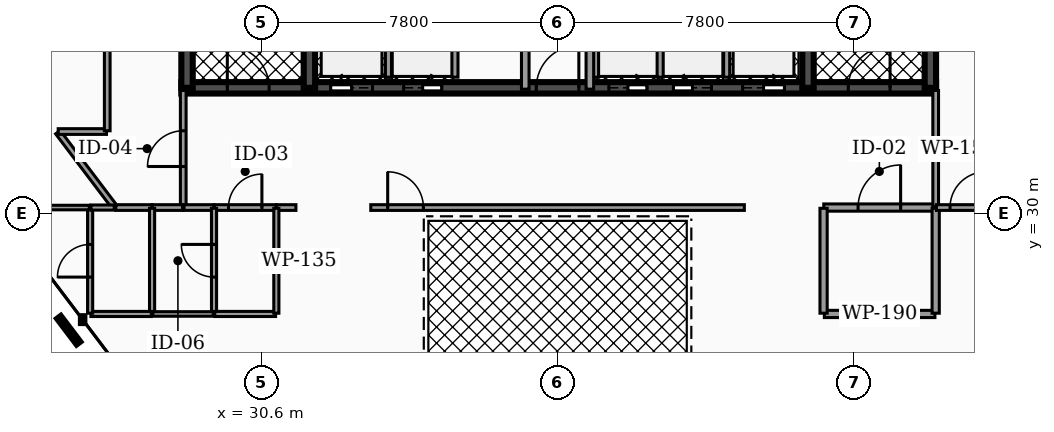
"""IFC4 building model, lengths in metres.
Left out: names, types, materials, properties, quantities, classifications, styles, units other than length and angle.
Written with IfcOpenShell. Run it as: python <this file> out.ifc"""

import sys

from ifc_helpers import new_model, si_unit, direction, frame, frame_2d, origin, place, context, subcontext, project, spatial, rectangle, extrude, element, fill, save


model = new_model("IFC4")
c1 = context("Model", 3, precision=1e-05, world=origin(), true_north=direction((0.0, 1.0)))
c2 = subcontext(c1, "Body", "Model", "MODEL_VIEW")
j1 = project(units=[si_unit("LENGTHUNIT", "METRE"), si_unit("PLANEANGLEUNIT", "RADIAN")], contexts=[c1])
p1 = place(None, origin())
s1 = spatial("IfcSite", under=j1, at=p1, CompositionType="ELEMENT")
p2 = place(p1, origin())
s2 = spatial("IfcBuilding", under=s1, at=p2, CompositionType="ELEMENT")
p3 = place(p2, frame((0.0, 0.0, 232.56)))
s3 = spatial("IfcBuildingStorey", under=s2, at=p3, CompositionType="ELEMENT", Elevation=232.56)
p4 = place(p3, frame((28.5, 33.3, 0.0), z_axis=(0.0, 0.0, 1.0), x_axis=(1.0, 0.0, 0.0)))
e1 = element("IfcWall", 1, at=p4, inside=s3, PredefinedType="SHEAR", context=c2, shape_type="SweptSolid", body=[
    extrude(rectangle(XDim=19.86, YDim=0.3, at=frame_2d((9.93, 0.0))), origin(), (0.0, 0.0, 1.0), 3.18),
])
p5 = place(p4, frame((3.93, 0.0, 0.0)))
e2 = element("IfcOpeningElement", 2, at=p5, cuts=e1, PredefinedType="OPENING", context=c2, shape_type="SweptSolid", body=[
    extrude(rectangle(XDim=1.1, YDim=2.15, at=frame_2d((0.55, 1.075))), frame((0.0, 0.16, 0.0), z_axis=(0.0, -1.0, 0.0), x_axis=(1.0, 0.0, 0.0)), (0.0, 0.0, 1.0), 0.32),
])
p6 = place(p4, frame((14.77, 0.0, 0.0)))
e3 = element("IfcOpeningElement", 3, at=p6, cuts=e1, PredefinedType="OPENING", context=c2, shape_type="SweptSolid", body=[
    extrude(rectangle(XDim=1.1, YDim=2.15, at=frame_2d((0.55, 1.075))), frame((0.0, 0.16, 0.0), z_axis=(0.0, -1.0, 0.0), x_axis=(1.0, 0.0, 0.0)), (0.0, 0.0, 1.0), 0.32),
])
p7 = place(p4, frame((11.25, 0.0, 0.0)))
e4 = element("IfcOpeningElement", 4, at=p7, cuts=e1, PredefinedType="OPENING", context=c2, shape_type="SweptSolid", body=[
    extrude(rectangle(XDim=1.0, YDim=2.1, at=frame_2d((0.5, 1.05))), frame((0.0, 0.16, 0.0), z_axis=(0.0, -1.0, 0.0), x_axis=(1.0, 0.0, 0.0)), (0.0, 0.0, 1.0), 0.32),
])
p8 = place(p4, frame((12.95, 0.0, 0.0)))
e5 = element("IfcOpeningElement", 5, at=p8, cuts=e1, PredefinedType="OPENING", context=c2, shape_type="SweptSolid", body=[
    extrude(rectangle(XDim=1.0, YDim=2.1, at=frame_2d((0.5, 1.05))), frame((0.0, 0.16, 0.0), z_axis=(0.0, -1.0, 0.0), x_axis=(1.0, 0.0, 0.0)), (0.0, 0.0, 1.0), 0.32),
])
p9 = place(p4, frame((5.85, 0.0, 0.0)))
e6 = element("IfcOpeningElement", 6, at=p9, cuts=e1, PredefinedType="OPENING", context=c2, shape_type="SweptSolid", body=[
    extrude(rectangle(XDim=1.0, YDim=2.1, at=frame_2d((0.5, 1.05))), frame((0.0, 0.16, 0.0), z_axis=(0.0, -1.0, 0.0), x_axis=(1.0, 0.0, 0.0)), (0.0, 0.0, 1.0), 0.32),
])
p10 = place(p4, frame((1.21, 0.0, 0.0)))
e7 = element("IfcOpeningElement", 7, at=p10, cuts=e1, PredefinedType="OPENING", context=c2, shape_type="SweptSolid", body=[
    extrude(rectangle(XDim=1.1, YDim=2.2, at=frame_2d((0.55, 1.1))), frame((0.0, 0.16, 0.0), z_axis=(0.0, -1.0, 0.0), x_axis=(1.0, 0.0, 0.0)), (0.0, 0.0, 1.0), 0.32),
])
p11 = place(p4, frame((9.34, 0.0, 0.0)))
e8 = element("IfcOpeningElement", 8, at=p11, cuts=e1, PredefinedType="OPENING", context=c2, shape_type="SweptSolid", body=[
    extrude(rectangle(XDim=1.12, YDim=2.05, at=frame_2d((0.56, 1.025))), frame((0.0, 0.16, 0.0), z_axis=(0.0, -1.0, 0.0), x_axis=(1.0, 0.0, 0.0)), (0.0, 0.0, 1.0), 0.32),
])
p12 = place(p4, frame((17.55, 0.0, 0.0)))
e9 = element("IfcOpeningElement", 9, at=p12, cuts=e1, PredefinedType="OPENING", context=c2, shape_type="SweptSolid", body=[
    extrude(rectangle(XDim=1.1, YDim=2.2, at=frame_2d((0.55, 1.1))), frame((0.0, 0.16, 0.0), z_axis=(0.0, -1.0, 0.0), x_axis=(1.0, 0.0, 0.0)), (0.0, 0.0, 1.0), 0.32),
])
for number, where, z_axis, x_axis in (
    (10, (28.65, 33.3, 0.0), (0.0, 0.0, 1.0), (0.0, 1.0, 0.0)),
    (11, (31.87, 33.3, 0.0), (0.0, 0.0, 1.0), (0.0, 1.0, 0.0)),
    (12, (44.99, 33.3, 0.0), (0.0, 0.0, 1.0), (0.0, 1.0, 0.0)),
    (13, (48.21, 33.3, 0.0), (0.0, 0.0, 1.0), (0.0, 1.0, 0.0)),
):
    element("IfcWall", number, at=place(p3, frame(where, z_axis=z_axis, x_axis=x_axis)), inside=s3, PredefinedType="SHEAR", context=c2, shape_type="SweptSolid", body=[
        extrude(rectangle(XDim=10.1, YDim=0.3, at=frame_2d((5.05, 0.0))), origin(), (0.0, 0.0, 1.0), 3.18),
    ])
for number, where, z_axis, x_axis in (
    (14, (33.95, 33.58, 0.0), (0.0, 0.0, 1.0), (0.0, 1.0, 0.0)),
    (15, (42.85, 33.58, 0.0), (0.0, 0.0, 1.0), (0.0, 1.0, 0.0)),
):
    element("IfcWall", number, at=place(p3, frame(where, z_axis=z_axis, x_axis=x_axis)), inside=s3, PredefinedType="SOLIDWALL", context=c2, shape_type="SweptSolid", body=[
        extrude(rectangle(XDim=2.45, YDim=0.16, at=frame_2d((1.225, 0.0))), origin(), (0.0, 0.0, 1.0), 3.18),
    ])
for number, where, z_axis, x_axis in (
    (16, (39.4, 33.58, 0.0), (0.0, 0.0, 1.0), (0.0, 1.0, 0.0)),
    (17, (41.1, 33.58, 0.0), (0.0, 0.0, 1.0), (0.0, 1.0, 0.0)),
    (18, (35.7, 33.58, 0.0), (0.0, 0.0, 1.0), (0.0, 1.0, 0.0)),
):
    element("IfcWall", number, at=place(p3, frame(where, z_axis=z_axis, x_axis=x_axis)), inside=s3, PredefinedType="SOLIDWALL", context=c2, shape_type="SweptSolid", body=[
        extrude(rectangle(XDim=2.25, YDim=0.16, at=frame_2d((1.125, 0.0))), origin(), (0.0, 0.0, 1.0), 3.18),
    ])
p13 = place(p3, frame((37.55, 33.265, 0.0), z_axis=(0.0, 0.0, 1.0), x_axis=(0.0, 1.0, 0.0)))
e19 = element("IfcWall", 19, at=p13, inside=s3, PredefinedType="PARTITIONING", context=c2, shape_type="SweptSolid", body=[
    extrude(rectangle(XDim=4.595, YDim=0.2, at=frame_2d((2.298, 0.0))), origin(), (0.0, 0.0, 1.0), 2.235),
])
p14 = place(p13, frame((1.857, 0.0, 0.0)))
e20 = element("IfcOpeningElement", 20, at=p14, cuts=e19, PredefinedType="OPENING", context=c2, shape_type="SweptSolid", body=[
    extrude(rectangle(XDim=0.88, YDim=2.05, at=frame_2d((0.44, 1.025))), frame((0.0, 0.11, 0.0), z_axis=(0.0, -1.0, 0.0), x_axis=(1.0, 0.0, 0.0)), (0.0, 0.0, 1.0), 0.22),
])
p15 = place(p3, frame((39.25, 33.265, 0.0), z_axis=(0.0, 0.0, 1.0), x_axis=(0.0, 1.0, 0.0)))
e21 = element("IfcWall", 21, at=p15, inside=s3, PredefinedType="PARTITIONING", context=c2, shape_type="SweptSolid", body=[
    extrude(rectangle(XDim=4.595, YDim=0.2, at=frame_2d((2.298, 0.0))), origin(), (0.0, 0.0, 1.0), 2.235),
])
p16 = place(p15, frame((3.058, 0.0, 0.0)))
e22 = element("IfcOpeningElement", 22, at=p16, cuts=e21, PredefinedType="OPENING", context=c2, shape_type="SweptSolid", body=[
    extrude(rectangle(XDim=0.88, YDim=2.05, at=frame_2d((0.44, 1.025))), frame((0.0, 0.11, 0.0), z_axis=(0.0, -1.0, 0.0), x_axis=(1.0, 0.0, 0.0)), (0.0, 0.0, 1.0), 0.22),
])
p17 = place(p3, frame((45.405, 30.15, 0.0), z_axis=(0.0, 0.0, 1.0), x_axis=(1.0, 0.0, 0.0)))
e23 = element("IfcWall", 23, at=p17, inside=s3, PredefinedType="PARTITIONING", context=c2, shape_type="SweptSolid", body=[
    extrude(rectangle(XDim=2.925, YDim=0.19, at=frame_2d((1.462, 0.0))), origin(), (0.0, 0.0, 1.0), 2.235),
])
p18 = place(p17, frame((0.903, 0.0, 0.0)))
e24 = element("IfcOpeningElement", 24, at=p18, cuts=e23, PredefinedType="OPENING", context=c2, shape_type="SweptSolid", body=[
    extrude(rectangle(XDim=1.12, YDim=2.05, at=frame_2d((0.56, 1.025))), frame((0.0, 0.105, 0.0), z_axis=(0.0, -1.0, 0.0), x_axis=(1.0, 0.0, 0.0)), (0.0, 0.0, 1.0), 0.21),
])
p19 = place(p3, frame((28.55, 30.17, 0.0), z_axis=(0.0, 0.0, 1.0), x_axis=(0.0, 1.0, 0.0)))
e25 = element("IfcWall", 25, at=p19, inside=s3, PredefinedType="PARTITIONING", context=c2, shape_type="SweptSolid", body=[
    extrude(rectangle(XDim=3.06, YDim=0.15, at=frame_2d((1.53, 0.0))), origin(), (0.0, 0.0, 1.0), 2.235),
])
p20 = place(p19, frame((1.06, 0.0, 0.0)))
e26 = element("IfcOpeningElement", 26, at=p20, cuts=e25, PredefinedType="OPENING", context=c2, shape_type="SweptSolid", body=[
    extrude(rectangle(XDim=0.94, YDim=2.05, at=frame_2d((0.47, 1.025))), frame((0.0, 0.085, 0.0), z_axis=(0.0, -1.0, 0.0), x_axis=(1.0, 0.0, 0.0)), (0.0, 0.0, 1.0), 0.17),
])
p21 = place(p3, frame((48.35, 30.17, 0.0), z_axis=(0.0, 0.0, 1.0), x_axis=(0.0, 1.0, 0.0)))
e27 = element("IfcWall", 27, at=p21, inside=s3, PredefinedType="PARTITIONING", context=c2, shape_type="SweptSolid", body=[
    extrude(rectangle(XDim=3.06, YDim=0.15, at=frame_2d((1.53, 0.0))), origin(), (0.0, 0.0, 1.0), 2.235),
])
p22 = place(p3, frame((29.365, 30.15, 0.0), z_axis=(0.0, 0.0, 1.0), x_axis=(1.0, 0.0, 0.0)))
e28 = element("IfcWall", 28, at=p22, inside=s3, PredefinedType="PARTITIONING", context=c2, shape_type="SweptSolid", body=[
    extrude(rectangle(XDim=1.63, YDim=0.15, at=frame_2d((0.815, 0.0))), origin(), (0.0, 0.0, 1.0), 2.235),
])
p23 = place(p22, frame((0.375, 0.0, 0.0)))
e29 = element("IfcOpeningElement", 29, at=p23, cuts=e28, PredefinedType="OPENING", context=c2, shape_type="SweptSolid", body=[
    extrude(rectangle(XDim=0.88, YDim=2.05, at=frame_2d((0.44, 1.025))), frame((0.0, 0.085, 0.0), z_axis=(0.0, -1.0, 0.0), x_axis=(1.0, 0.0, 0.0)), (0.0, 0.0, 1.0), 0.17),
])
p24 = place(p3, frame((28.57, 30.15, 0.0), z_axis=(0.0, 0.0, 1.0), x_axis=(1.0, 0.0, 0.0)))
e30 = element("IfcWall", 30, at=p24, inside=s3, PredefinedType="PARTITIONING", context=c2, shape_type="SweptSolid", body=[
    extrude(rectangle(XDim=0.785, YDim=0.15, at=frame_2d((0.393, 0.0))), origin(), (0.0, 0.0, 1.0), 2.235),
])
p25 = place(p3, frame((33.485, 30.15, 0.0), z_axis=(0.0, 0.0, 1.0), x_axis=(1.0, 0.0, 0.0)))
e31 = element("IfcWall", 31, at=p25, inside=s3, PredefinedType="PARTITIONING", context=c2, shape_type="SweptSolid", body=[
    extrude(rectangle(XDim=9.83, YDim=0.15, at=frame_2d((4.915, 0.0))), origin(), (0.0, 0.0, 1.0), 2.235),
])
p26 = place(p25, frame((0.445, 0.0, 0.0)))
e32 = element("IfcOpeningElement", 32, at=p26, cuts=e31, PredefinedType="OPENING", context=c2, shape_type="SweptSolid", body=[
    extrude(rectangle(XDim=0.94, YDim=2.05, at=frame_2d((0.47, 1.025))), frame((0.0, 0.085, 0.0), z_axis=(0.0, -1.0, 0.0), x_axis=(1.0, 0.0, 0.0)), (0.0, 0.0, 1.0), 0.17),
])
p27 = place(p3, frame((31.005, 30.15, 0.0), z_axis=(0.0, 0.0, 1.0), x_axis=(1.0, 0.0, 0.0)))
e33 = element("IfcWall", 33, at=p27, inside=s3, PredefinedType="PARTITIONING", context=c2, shape_type="SweptSolid", body=[
    extrude(rectangle(XDim=0.51, YDim=0.15, at=frame_2d((0.255, 0.0))), origin(), (0.0, 0.0, 1.0), 2.235),
])
p28 = place(p3, frame((45.42, 27.35, 0.0), z_axis=(0.0, 0.0, 1.0), x_axis=(1.0, 0.0, 0.0)))
e34 = element("IfcWall", 34, at=p28, inside=s3, PredefinedType="PARTITIONING", context=c2, shape_type="SweptSolid", body=[
    extrude(rectangle(XDim=2.91, YDim=0.19, at=frame_2d((1.455, 0.0))), origin(), (0.0, 0.0, 1.0), 2.235),
])
for number, where, z_axis, x_axis in (
    (35, (45.4, 27.37, 0.0), (0.0, 0.0, 1.0), (0.0, 1.0, 0.0)),
    (36, (48.35, 27.37, 0.0), (0.0, 0.0, 1.0), (0.0, 1.0, 0.0)),
):
    element("IfcWall", number, at=place(p3, frame(where, z_axis=z_axis, x_axis=x_axis)), inside=s3, PredefinedType="PARTITIONING", context=c2, shape_type="SweptSolid", body=[
        extrude(rectangle(XDim=2.76, YDim=0.19, at=frame_2d((1.38, 0.0))), origin(), (0.0, 0.0, 1.0), 2.235),
    ])
p29 = place(p3, frame((26.775, 30.15, 0.0), z_axis=(0.0, 0.0, 1.0), x_axis=(1.0, 0.0, 0.0)))
e37 = element("IfcWall", 37, at=p29, inside=s3, PredefinedType="PARTITIONING", context=c2, shape_type="SweptSolid", body=[
    extrude(rectangle(XDim=0.95, YDim=0.15, at=frame_2d((0.475, 0.0))), origin(), (0.0, 0.0, 1.0), 2.235),
])
p30 = place(p3, frame((27.735, 30.15, 0.0), z_axis=(0.0, 0.0, 1.0), x_axis=(1.0, 0.0, 0.0)))
e38 = element("IfcWall", 38, at=p30, inside=s3, PredefinedType="PARTITIONING", context=c2, shape_type="SweptSolid", body=[
    extrude(rectangle(XDim=0.795, YDim=0.15, at=frame_2d((0.397, 0.0))), origin(), (0.0, 0.0, 1.0), 2.235),
])
p31 = place(p3, frame((48.37, 30.15, 0.0), z_axis=(0.0, 0.0, 1.0), x_axis=(1.0, 0.0, 0.0)))
e39 = element("IfcWall", 39, at=p31, inside=s3, PredefinedType="PARTITIONING", context=c2, shape_type="SweptSolid", body=[
    extrude(rectangle(XDim=1.655, YDim=0.15, at=frame_2d((0.828, 0.0))), origin(), (0.0, 0.0, 1.0), 2.235),
])
p32 = place(p31, frame((0.358, 0.0, 0.0)))
e40 = element("IfcOpeningElement", 40, at=p32, cuts=e39, PredefinedType="OPENING", context=c2, shape_type="SweptSolid", body=[
    extrude(rectangle(XDim=0.94, YDim=2.05, at=frame_2d((0.47, 1.025))), frame((0.0, 0.085, 0.0), z_axis=(0.0, -1.0, 0.0), x_axis=(1.0, 0.0, 0.0)), (0.0, 0.0, 1.0), 0.17),
])
p33 = place(p3, frame((25.252, 32.134, 0.0), z_axis=(0.0, 0.0, 1.0), x_axis=(0.603869110647, -0.797083494502, 0.0)))
e41 = element("IfcWall", 41, at=p33, inside=s3, PredefinedType="PARTITIONING", context=c2, shape_type="SweptSolid", body=[
    extrude(rectangle(XDim=2.469, YDim=0.15, at=frame_2d((1.234, 0.0))), origin(), (0.0, 0.0, 1.0), 2.235),
])
p34 = place(p3, frame((25.26, 32.15, 0.0), z_axis=(0.0, 0.0, 1.0), x_axis=(1.0, 0.0, 0.0)))
e42 = element("IfcWall", 42, at=p34, inside=s3, PredefinedType="PARTITIONING", context=c2, shape_type="SweptSolid", body=[
    extrude(rectangle(XDim=1.271, YDim=0.15, at=frame_2d((0.635, 0.0))), origin(), (0.0, 0.0, 1.0), 2.235),
])
p35 = place(p3, frame((26.55, 32.17, 0.0), z_axis=(0.0, 0.0, 1.0), x_axis=(0.0, 1.0, 0.0)))
e43 = element("IfcWall", 43, at=p35, inside=s3, PredefinedType="PARTITIONING", context=c2, shape_type="SweptSolid", body=[
    extrude(rectangle(XDim=11.38, YDim=0.15, at=frame_2d((5.69, 0.0))), origin(), (0.0, 0.0, 1.0), 2.235),
])
p36 = place(p35, frame((5.22, 0.0, 0.0)))
e44 = element("IfcOpeningElement", 44, at=p36, cuts=e43, PredefinedType="OPENING", context=c2, shape_type="SweptSolid", body=[
    extrude(rectangle(XDim=0.94, YDim=2.05, at=frame_2d((0.47, 1.025))), frame((0.0, 0.085, 0.0), z_axis=(0.0, -1.0, 0.0), x_axis=(1.0, 0.0, 0.0)), (0.0, 0.0, 1.0), 0.17),
])
p37 = place(p3, frame((29.36, 27.37, 0.0), z_axis=(0.0, 0.0, 1.0), x_axis=(0.0, 1.0, 0.0)))
e45 = element("IfcWall", 45, at=p37, inside=s3, PredefinedType="PARTITIONING", context=c2, shape_type="SweptSolid", body=[
    extrude(rectangle(XDim=2.76, YDim=0.135, at=frame_2d((1.38, 0.0))), origin(), (0.0, 0.0, 1.0), 2.235),
])
p38 = place(p37, frame((0.95, 0.0, 0.0)))
e46 = element("IfcOpeningElement", 46, at=p38, cuts=e45, PredefinedType="OPENING", context=c2, shape_type="SweptSolid", body=[
    extrude(rectangle(XDim=0.86, YDim=2.05, at=frame_2d((0.43, 1.025))), frame((0.0, 0.077, 0.0), z_axis=(0.0, -1.0, 0.0), x_axis=(1.0, 0.0, 0.0)), (0.0, 0.0, 1.0), 0.155),
])
p39 = place(p3, frame((29.38, 27.35, 0.0), z_axis=(0.0, 0.0, 1.0), x_axis=(1.0, 0.0, 0.0)))
e47 = element("IfcWall", 47, at=p39, inside=s3, PredefinedType="PARTITIONING", context=c2, shape_type="SweptSolid", body=[
    extrude(rectangle(XDim=1.6, YDim=0.135, at=frame_2d((0.8, 0.0))), origin(), (0.0, 0.0, 1.0), 2.235),
])
for number, where, z_axis, x_axis in (
    (48, (31.0, 27.37, 0.0), (0.0, 0.0, 1.0), (0.0, 1.0, 0.0)),
    (49, (27.73, 27.37, 0.0), (0.0, 0.0, 1.0), (0.0, 1.0, 0.0)),
):
    element("IfcWall", number, at=place(p3, frame(where, z_axis=z_axis, x_axis=x_axis)), inside=s3, PredefinedType="PARTITIONING", context=c2, shape_type="SweptSolid", body=[
        extrude(rectangle(XDim=2.76, YDim=0.135, at=frame_2d((1.38, 0.0))), origin(), (0.0, 0.0, 1.0), 2.235),
    ])
p40 = place(p3, frame((26.12, 27.35, 0.0), z_axis=(0.0, 0.0, 1.0), x_axis=(1.0, 0.0, 0.0)))
e50 = element("IfcWall", 50, at=p40, inside=s3, PredefinedType="PARTITIONING", context=c2, shape_type="SweptSolid", body=[
    extrude(rectangle(XDim=1.59, YDim=0.135, at=frame_2d((0.795, 0.0))), origin(), (0.0, 0.0, 1.0), 2.235),
])
p41 = place(p3, frame((26.1, 27.37, 0.0), z_axis=(0.0, 0.0, 1.0), x_axis=(0.0, 1.0, 0.0)))
e51 = element("IfcWall", 51, at=p41, inside=s3, PredefinedType="PARTITIONING", context=c2, shape_type="SweptSolid", body=[
    extrude(rectangle(XDim=2.76, YDim=0.135, at=frame_2d((1.38, 0.0))), origin(), (0.0, 0.0, 1.0), 2.235),
])
p42 = place(p41, frame((0.95, 0.0, 0.0)))
e52 = element("IfcOpeningElement", 52, at=p42, cuts=e51, PredefinedType="OPENING", context=c2, shape_type="SweptSolid", body=[
    extrude(rectangle(XDim=0.86, YDim=2.05, at=frame_2d((0.43, 1.025))), frame((0.0, 0.077, 0.0), z_axis=(0.0, -1.0, 0.0), x_axis=(1.0, 0.0, 0.0)), (0.0, 0.0, 1.0), 0.155),
])
p43 = place(p3, frame((26.12, 30.15, 0.0), z_axis=(0.0, 0.0, 1.0), x_axis=(1.0, 0.0, 0.0)))
e53 = element("IfcWall", 53, at=p43, inside=s3, PredefinedType="PARTITIONING", context=c2, shape_type="SweptSolid", body=[
    extrude(rectangle(XDim=0.615, YDim=0.135, at=frame_2d((0.307, 0.0))), origin(), (0.0, 0.0, 1.0), 2.235),
])
p44 = place(p3, frame((27.75, 27.35, 0.0), z_axis=(0.0, 0.0, 1.0), x_axis=(1.0, 0.0, 0.0)))
e54 = element("IfcWall", 54, at=p44, inside=s3, PredefinedType="PARTITIONING", context=c2, shape_type="SweptSolid", body=[
    extrude(rectangle(XDim=1.59, YDim=0.12, at=frame_2d((0.795, 0.0))), origin(), (0.0, 0.0, 1.0), 2.235),
])
p45 = place(p3, frame((24.754, 30.15, 0.0), z_axis=(0.0, 0.0, 1.0), x_axis=(1.0, 0.0, 0.0)))
e55 = element("IfcWall", 55, at=p45, inside=s3, PredefinedType="PARTITIONING", context=c2, shape_type="SweptSolid", body=[
    extrude(rectangle(XDim=1.326, YDim=0.12, at=frame_2d((0.663, 0.0))), origin(), (0.0, 0.0, 1.0), 2.235),
])
p46 = place(p5, origin())
e56 = element("IfcDoor", 56, at=p46, inside=s3, OperationType="SLIDING_TO_LEFT", PredefinedType="DOOR", context=c2, shape_type="SweptSolid", body=[
    extrude(rectangle(XDim=1.1, YDim=2.15, at=frame_2d((0.55, 1.075))), frame((0.0, 0.025, 0.0), z_axis=(0.0, -1.0, 0.0), x_axis=(1.0, 0.0, 0.0)), (0.0, 0.0, 1.0), 0.05),
])
fill(e2, e56)
p47 = place(p6, origin())
e57 = element("IfcDoor", 57, at=p47, inside=s3, OperationType="SLIDING_TO_RIGHT", PredefinedType="DOOR", context=c2, shape_type="SweptSolid", body=[
    extrude(rectangle(XDim=1.1, YDim=2.15, at=frame_2d((0.55, 1.075))), frame((0.0, 0.025, 0.0), z_axis=(0.0, -1.0, 0.0), x_axis=(1.0, 0.0, 0.0)), (0.0, 0.0, 1.0), 0.05),
])
fill(e3, e57)
p48 = place(p7, origin())
e58 = element("IfcDoor", 58, at=p48, inside=s3, OperationType="SLIDING_TO_RIGHT", PredefinedType="DOOR", context=c2, shape_type="SweptSolid", body=[
    extrude(rectangle(XDim=1.0, YDim=2.1, at=frame_2d((0.5, 1.05))), frame((0.0, 0.025, 0.0), z_axis=(0.0, -1.0, 0.0), x_axis=(1.0, 0.0, 0.0)), (0.0, 0.0, 1.0), 0.05),
])
fill(e4, e58)
p49 = place(p8, origin())
e59 = element("IfcDoor", 59, at=p49, inside=s3, OperationType="SLIDING_TO_LEFT", PredefinedType="DOOR", context=c2, shape_type="SweptSolid", body=[
    extrude(rectangle(XDim=1.0, YDim=2.1, at=frame_2d((0.5, 1.05))), frame((0.0, 0.025, 0.0), z_axis=(0.0, -1.0, 0.0), x_axis=(1.0, 0.0, 0.0)), (0.0, 0.0, 1.0), 0.05),
])
fill(e5, e59)
p50 = place(p9, origin())
e60 = element("IfcDoor", 60, at=p50, inside=s3, OperationType="SLIDING_TO_RIGHT", PredefinedType="DOOR", context=c2, shape_type="SweptSolid", body=[
    extrude(rectangle(XDim=1.0, YDim=2.1, at=frame_2d((0.5, 1.05))), frame((0.0, 0.025, 0.0), z_axis=(0.0, -1.0, 0.0), x_axis=(1.0, 0.0, 0.0)), (0.0, 0.0, 1.0), 0.05),
])
fill(e6, e60)
p51 = place(p10, origin())
e61 = element("IfcDoor", 61, at=p51, inside=s3, OperationType="SINGLE_SWING_LEFT", PredefinedType="DOOR", context=c2, shape_type="SweptSolid", body=[
    extrude(rectangle(XDim=1.1, YDim=2.2, at=frame_2d((0.55, 1.1))), frame((0.0, 0.025, 0.0), z_axis=(0.0, -1.0, 0.0), x_axis=(1.0, 0.0, 0.0)), (0.0, 0.0, 1.0), 0.05),
])
fill(e7, e61)
p52 = place(p11, origin())
e62 = element("IfcDoor", 62, at=p52, inside=s3, OperationType="SINGLE_SWING_RIGHT", PredefinedType="DOOR", context=c2, shape_type="SweptSolid", body=[
    extrude(rectangle(XDim=1.12, YDim=2.05, at=frame_2d((0.56, 1.025))), frame((0.0, 0.025, 0.0), z_axis=(0.0, -1.0, 0.0), x_axis=(1.0, 0.0, 0.0)), (0.0, 0.0, 1.0), 0.05),
])
fill(e8, e62)
p53 = place(p12, origin())
e63 = element("IfcDoor", 63, at=p53, inside=s3, OperationType="SINGLE_SWING_RIGHT", PredefinedType="DOOR", context=c2, shape_type="SweptSolid", body=[
    extrude(rectangle(XDim=1.1, YDim=2.2, at=frame_2d((0.55, 1.1))), frame((0.0, 0.025, 0.0), z_axis=(0.0, -1.0, 0.0), x_axis=(1.0, 0.0, 0.0)), (0.0, 0.0, 1.0), 0.05),
])
fill(e9, e63)
p54 = place(p18, origin())
e64 = element("IfcDoor", 64, at=p54, inside=s3, OperationType="SINGLE_SWING_RIGHT", PredefinedType="DOOR", context=c2, shape_type="SweptSolid", body=[
    extrude(rectangle(XDim=1.12, YDim=2.05, at=frame_2d((0.56, 1.025))), frame((0.0, 0.025, 0.0), z_axis=(0.0, -1.0, 0.0), x_axis=(1.0, 0.0, 0.0)), (0.0, 0.0, 1.0), 0.05),
])
fill(e24, e64)
p55 = place(p20, origin())
e65 = element("IfcDoor", 65, at=p55, inside=s3, OperationType="SINGLE_SWING_LEFT", PredefinedType="DOOR", context=c2, shape_type="SweptSolid", body=[
    extrude(rectangle(XDim=0.94, YDim=2.05, at=frame_2d((0.47, 1.025))), frame((0.0, 0.025, 0.0), z_axis=(0.0, -1.0, 0.0), x_axis=(1.0, 0.0, 0.0)), (0.0, 0.0, 1.0), 0.05),
])
fill(e26, e65)
p56 = place(p23, origin())
e66 = element("IfcDoor", 66, at=p56, inside=s3, OperationType="SINGLE_SWING_RIGHT", PredefinedType="DOOR", context=c2, shape_type="SweptSolid", body=[
    extrude(rectangle(XDim=0.88, YDim=2.05, at=frame_2d((0.44, 1.025))), frame((0.0, 0.025, 0.0), z_axis=(0.0, -1.0, 0.0), x_axis=(1.0, 0.0, 0.0)), (0.0, 0.0, 1.0), 0.05),
])
fill(e29, e66)
p57 = place(p26, origin())
e67 = element("IfcDoor", 67, at=p57, inside=s3, OperationType="SINGLE_SWING_LEFT", PredefinedType="DOOR", context=c2, shape_type="SweptSolid", body=[
    extrude(rectangle(XDim=0.94, YDim=2.05, at=frame_2d((0.47, 1.025))), frame((0.0, 0.025, 0.0), z_axis=(0.0, -1.0, 0.0), x_axis=(1.0, 0.0, 0.0)), (0.0, 0.0, 1.0), 0.05),
])
fill(e32, e67)
p58 = place(p32, origin())
e68 = element("IfcDoor", 68, at=p58, inside=s3, OperationType="SINGLE_SWING_RIGHT", PredefinedType="DOOR", context=c2, shape_type="SweptSolid", body=[
    extrude(rectangle(XDim=0.94, YDim=2.05, at=frame_2d((0.47, 1.025))), frame((0.0, 0.025, 0.0), z_axis=(0.0, -1.0, 0.0), x_axis=(1.0, 0.0, 0.0)), (0.0, 0.0, 1.0), 0.05),
])
fill(e40, e68)
p59 = place(p38, origin())
e69 = element("IfcDoor", 69, at=p59, inside=s3, OperationType="SINGLE_SWING_RIGHT", PredefinedType="DOOR", context=c2, shape_type="SweptSolid", body=[
    extrude(rectangle(XDim=0.86, YDim=2.05, at=frame_2d((0.43, 1.025))), frame((0.0, 0.025, 0.0), z_axis=(0.0, -1.0, 0.0), x_axis=(1.0, 0.0, 0.0)), (0.0, 0.0, 1.0), 0.05),
])
fill(e46, e69)
p60 = place(p42, origin())
e70 = element("IfcDoor", 70, at=p60, inside=s3, OperationType="SINGLE_SWING_LEFT", PredefinedType="DOOR", context=c2, shape_type="SweptSolid", body=[
    extrude(rectangle(XDim=0.86, YDim=2.05, at=frame_2d((0.43, 1.025))), frame((0.0, 0.025, 0.0), z_axis=(0.0, -1.0, 0.0), x_axis=(1.0, 0.0, 0.0)), (0.0, 0.0, 1.0), 0.05),
])
fill(e52, e70)
save(model, sys.argv[1])
